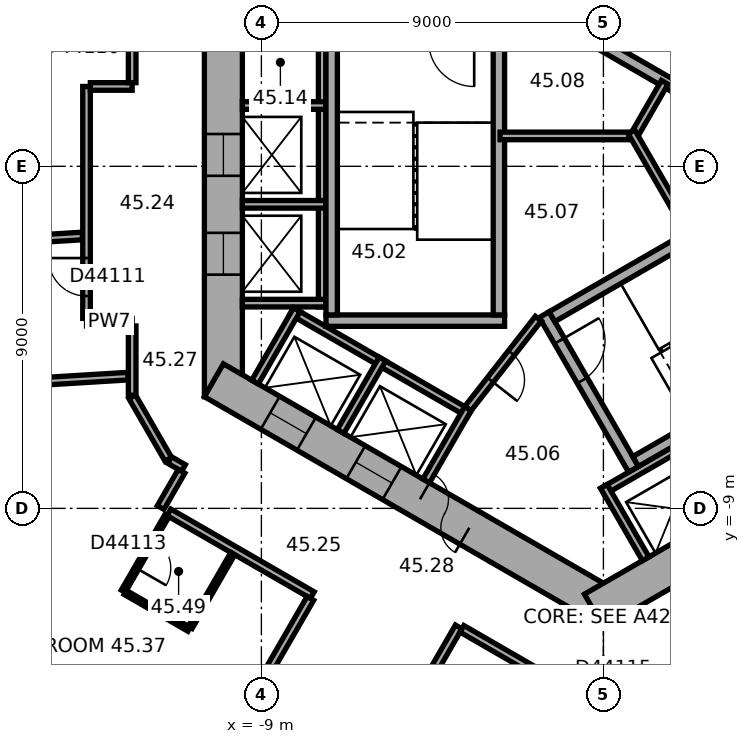
"""IFC4 building model, lengths in metres.
Left out: names, types, materials, properties, quantities, classifications, styles, units other than length and angle.
Written with IfcOpenShell. Run it as: python <this file> out.ifc"""

import sys

from ifc_helpers import new_model, si_unit, direction, frame, frame_2d, origin, place, context, subcontext, project, spatial, rectangle, extrude, element, fill, save


model = new_model("IFC4")
c1 = context("Model", 3, precision=1e-05, world=origin(), true_north=direction((0.0, 1.0)))
c2 = subcontext(c1, "Body", "Model", "MODEL_VIEW")
j1 = project(units=[si_unit("LENGTHUNIT", "METRE"), si_unit("PLANEANGLEUNIT", "RADIAN")], contexts=[c1])
p1 = place(None, origin())
s1 = spatial("IfcSite", under=j1, at=p1, CompositionType="ELEMENT")
p2 = place(p1, origin())
s2 = spatial("IfcBuilding", under=s1, at=p2, CompositionType="ELEMENT")
p3 = place(p2, frame((0.0, 0.0, 183.6)))
s3 = spatial("IfcBuildingStorey", under=s2, at=p3, CompositionType="ELEMENT", Elevation=183.6)
p4 = place(p3, frame((-10.0, 6.062, 0.0), z_axis=(0.0, 0.0, 1.0), x_axis=(0.0, -1.0, 0.0)))
e1 = element("IfcWall", 1, at=p4, inside=s3, PredefinedType="SHEAR", context=c2, shape_type="SweptSolid", body=[
    extrude(rectangle(XDim=12.125, YDim=1.0, at=frame_2d((6.062, 0.0))), origin(), (0.0, 0.0, 1.0), 3.7),
])
p5 = place(p4, frame((5.212, 0.0, 0.0)))
e2 = element("IfcOpeningElement", 2, at=p5, cuts=e1, PredefinedType="OPENING", context=c2, shape_type="SweptSolid", body=[
    extrude(rectangle(XDim=1.1, YDim=2.1, at=frame_2d((0.55, 1.05))), frame((0.0, 0.51, 0.0), z_axis=(0.0, -1.0, 0.0), x_axis=(1.0, 0.0, 0.0)), (0.0, 0.0, 1.0), 1.02),
])
p6 = place(p4, frame((7.812, 0.0, 0.0)))
e3 = element("IfcOpeningElement", 3, at=p6, cuts=e1, PredefinedType="OPENING", context=c2, shape_type="SweptSolid", body=[
    extrude(rectangle(XDim=1.1, YDim=2.1, at=frame_2d((0.55, 1.05))), frame((0.0, 0.51, 0.0), z_axis=(0.0, -1.0, 0.0), x_axis=(1.0, 0.0, 0.0)), (0.0, 0.0, 1.0), 1.02),
])
p7 = place(p3, frame((-10.25, -5.629, 0.0), z_axis=(0.0, 0.0, 1.0), x_axis=(0.866022616891, -0.50000482701, 0.0)))
e4 = element("IfcWall", 4, at=p7, inside=s3, PredefinedType="SHEAR", context=c2, shape_type="SweptSolid", body=[
    extrude(rectangle(XDim=12.125, YDim=1.0, at=frame_2d((6.062, 0.0))), origin(), (0.0, 0.0, 1.0), 3.7),
])
p8 = place(p7, frame((6.262, 0.0, 0.0)))
e5 = element("IfcOpeningElement", 5, at=p8, cuts=e4, PredefinedType="OPENING", context=c2, shape_type="SweptSolid", body=[
    extrude(rectangle(XDim=1.5, YDim=2.1, at=frame_2d((0.75, 1.05))), frame((0.0, 0.51, 0.0), z_axis=(0.0, -1.0, 0.0), x_axis=(1.0, 0.0, 0.0)), (0.0, 0.0, 1.0), 1.02),
])
p9 = place(p7, frame((1.712, 0.0, 0.0)))
e6 = element("IfcOpeningElement", 6, at=p9, cuts=e4, PredefinedType="OPENING", context=c2, shape_type="SweptSolid", body=[
    extrude(rectangle(XDim=1.1, YDim=2.1, at=frame_2d((0.55, 1.05))), frame((0.0, 0.51, 0.0), z_axis=(0.0, -1.0, 0.0), x_axis=(1.0, 0.0, 0.0)), (0.0, 0.0, 1.0), 1.02),
])
p10 = place(p7, frame((4.312, 0.0, 0.0)))
e7 = element("IfcOpeningElement", 7, at=p10, cuts=e4, PredefinedType="OPENING", context=c2, shape_type="SweptSolid", body=[
    extrude(rectangle(XDim=1.1, YDim=2.1, at=frame_2d((0.55, 1.05))), frame((0.0, 0.51, 0.0), z_axis=(0.0, -1.0, 0.0), x_axis=(1.0, 0.0, 0.0)), (0.0, 0.0, 1.0), 1.02),
])
p11 = place(p3, frame((-0.25, -11.691, 0.0), z_axis=(0.0, 0.0, 1.0), x_axis=(0.866022616891, 0.50000482701, 0.0)))
e8 = element("IfcWall", 8, at=p11, inside=s3, PredefinedType="SHEAR", context=c2, shape_type="SweptSolid", body=[
    extrude(rectangle(XDim=12.125, YDim=1.0, at=frame_2d((6.062, 0.0))), origin(), (0.0, 0.0, 1.0), 3.7),
])
p12 = place(p11, frame((2.612, 0.0, 0.0)))
e9 = element("IfcOpeningElement", 9, at=p12, cuts=e8, PredefinedType="OPENING", context=c2, shape_type="SweptSolid", body=[
    extrude(rectangle(XDim=1.1, YDim=2.1, at=frame_2d((0.55, 1.05))), frame((0.0, 0.51, 0.0), z_axis=(0.0, -1.0, 0.0), x_axis=(1.0, 0.0, 0.0)), (0.0, 0.0, 1.0), 1.02),
])
p13 = place(p11, frame((5.212, 0.0, 0.0)))
e10 = element("IfcOpeningElement", 10, at=p13, cuts=e8, PredefinedType="OPENING", context=c2, shape_type="SweptSolid", body=[
    extrude(rectangle(XDim=1.1, YDim=2.1, at=frame_2d((0.55, 1.05))), frame((0.0, 0.51, 0.0), z_axis=(0.0, -1.0, 0.0), x_axis=(1.0, 0.0, 0.0)), (0.0, 0.0, 1.0), 1.02),
])
p14 = place(p11, frame((7.812, 0.0, 0.0)))
e11 = element("IfcOpeningElement", 11, at=p14, cuts=e8, PredefinedType="OPENING", context=c2, shape_type="SweptSolid", body=[
    extrude(rectangle(XDim=1.1, YDim=2.1, at=frame_2d((0.55, 1.05))), frame((0.0, 0.51, 0.0), z_axis=(0.0, -1.0, 0.0), x_axis=(1.0, 0.0, 0.0)), (0.0, 0.0, 1.0), 1.02),
])
p15 = place(p3, frame((-7.4, 4.3, 0.0), z_axis=(0.0, 0.0, 1.0), x_axis=(0.0, -1.0, 0.0)))
e12 = element("IfcWall", 12, at=p15, inside=s3, PredefinedType="PARTITIONING", context=c2, shape_type="SweptSolid", body=[
    extrude(rectangle(XDim=8.0, YDim=0.2, at=frame_2d((4.0, 0.0))), origin(), (0.0, 0.0, 1.0), 3.42),
])
for number, where, z_axis, x_axis in (
    (13, (-7.3, 1.6, 0.0), (0.0, 0.0, 1.0), (-1.0, 0.0, 0.0)),
    (14, (-7.3, -1.0, 0.0), (0.0, 0.0, 1.0), (-1.0, 0.0, 0.0)),
    (15, (-7.3, -3.6, 0.0), (0.0, 0.0, 1.0), (-1.0, 0.0, 0.0)),
):
    element("IfcWall", number, at=place(p3, frame(where, z_axis=z_axis, x_axis=x_axis)), inside=s3, PredefinedType="PARTITIONING", context=c2, shape_type="SweptSolid", body=[
        extrude(rectangle(XDim=2.2, YDim=0.2, at=frame_2d((1.1, 0.0))), origin(), (0.0, 0.0, 1.0), 3.42),
    ])
p16 = place(p3, frame((-8.203, -3.809, 0.0), z_axis=(0.0, 0.0, 1.0), x_axis=(0.866028230842, -0.499995103361, 0.0)))
e16 = element("IfcWall", 16, at=p16, inside=s3, PredefinedType="PARTITIONING", context=c2, shape_type="SweptSolid", body=[
    extrude(rectangle(XDim=5.4, YDim=0.2, at=frame_2d((2.7, 0.0))), origin(), (0.0, 0.0, 1.0), 3.42),
])
for number, where, z_axis, x_axis in (
    (17, (-8.067, -3.772, 0.0), (0.0, 0.0, 1.0), (-0.5, -0.866, 0.0)),
    (18, (-5.815, -5.072, 0.0), (0.0, 0.0, 1.0), (-0.5, -0.866, 0.0)),
):
    element("IfcWall", number, at=place(p3, frame(where, z_axis=z_axis, x_axis=x_axis)), inside=s3, PredefinedType="PARTITIONING", context=c2, shape_type="SweptSolid", body=[
        extrude(rectangle(XDim=2.2, YDim=0.2, at=frame_2d((1.1, 0.0))), origin(), (0.0, 0.0, 1.0), 3.42),
    ])
p17 = place(p3, frame((-3.563, -6.372, 0.0), z_axis=(0.0, 0.0, 1.0), x_axis=(-0.499994660107, -0.866028486751, 0.0)))
e19 = element("IfcWall", 19, at=p17, inside=s3, PredefinedType="PARTITIONING", context=c2, shape_type="SweptSolid", body=[
    extrude(rectangle(XDim=2.2, YDim=0.2, at=frame_2d((1.1, 0.0))), origin(), (0.0, 0.0, 1.0), 3.42),
])
p18 = place(p3, frame((-0.024, -8.559, 0.0), z_axis=(0.0, 0.0, 1.0), x_axis=(0.866026010844, 0.49999894854, 0.0)))
e20 = element("IfcWall", 20, at=p18, inside=s3, PredefinedType="PARTITIONING", context=c2, shape_type="SweptSolid", body=[
    extrude(rectangle(XDim=8.0, YDim=0.2, at=frame_2d((4.0, 0.0))), origin(), (0.0, 0.0, 1.0), 3.42),
])
p19 = place(p3, frame((0.013, -8.422, 0.0), z_axis=(0.0, 0.0, 1.0), x_axis=(0.500077893725, -0.86598042715, 0.0)))
e21 = element("IfcWall", 21, at=p19, inside=s3, PredefinedType="PARTITIONING", context=c2, shape_type="SweptSolid", body=[
    extrude(rectangle(XDim=2.2, YDim=0.2, at=frame_2d((1.1, 0.0))), origin(), (0.0, 0.0, 1.0), 3.42),
])
p20 = place(p3, frame((4.103, 0.807, 0.0), z_axis=(0.0, 0.0, 1.0), x_axis=(-0.866027801685, 0.499995846692, 0.0)))
e22 = element("IfcWall", 22, at=p20, inside=s3, PredefinedType="SHEAR", context=c2, shape_type="SweptSolid", body=[
    extrude(rectangle(XDim=7.06, YDim=0.3, at=frame_2d((3.53, 0.0))), origin(), (0.0, 0.0, 1.0), 3.42),
])
p21 = place(p3, frame((-2.6, -4.06, 0.0), z_axis=(0.0, 0.0, 1.0), x_axis=(-1.0, 0.0, 0.0)))
e23 = element("IfcWall", 23, at=p21, inside=s3, PredefinedType="SHEAR", context=c2, shape_type="SweptSolid", body=[
    extrude(rectangle(XDim=4.7, YDim=0.3, at=frame_2d((2.35, 0.0))), origin(), (0.0, 0.0, 1.0), 3.42),
])
for number, where, z_axis, x_axis in (
    (24, (-2.75, 3.15, 0.0), (0.0, 0.0, 1.0), (0.0, -1.0, 0.0)),
    (25, (-7.15, 3.15, 0.0), (0.0, 0.0, 1.0), (0.0, -1.0, 0.0)),
):
    element("IfcWall", number, at=place(p3, frame(where, z_axis=z_axis, x_axis=x_axis)), inside=s3, PredefinedType="SHEAR", context=c2, shape_type="SweptSolid", body=[
        extrude(rectangle(XDim=7.06, YDim=0.3, at=frame_2d((3.53, 0.0))), origin(), (0.0, 0.0, 1.0), 3.42),
    ])
p22 = place(p3, frame((-1.558, -3.902, 0.0), z_axis=(0.0, 0.0, 1.0), x_axis=(0.499977259774, -0.866038532462, 0.0)))
e26 = element("IfcWall", 26, at=p22, inside=s3, PredefinedType="SHEAR", context=c2, shape_type="SweptSolid", body=[
    extrude(rectangle(XDim=4.7, YDim=0.3, at=frame_2d((2.35, 0.0))), origin(), (0.0, 0.0, 1.0), 3.42),
])
p23 = place(p22, frame((0.8, 0.0, 0.0)))
e27 = element("IfcOpeningElement", 27, at=p23, cuts=e26, PredefinedType="OPENING", context=c2, shape_type="SweptSolid", body=[
    extrude(rectangle(XDim=1.2, YDim=2.1, at=frame_2d((0.6, 1.05))), frame((0.0, 0.16, 0.0), z_axis=(0.0, -1.0, 0.0), x_axis=(1.0, 0.0, 0.0)), (0.0, 0.0, 1.0), 0.32),
])
for number, where, z_axis, x_axis in (
    (28, (-1.353, -3.957, 0.0), (0.0, 0.0, 1.0), (0.866, 0.5, 0.0)),
    (29, (0.847, -7.767, 0.0), (0.0, 0.0, 1.0), (0.866, 0.5, 0.0)),
):
    element("IfcWall", number, at=place(p3, frame(where, z_axis=z_axis, x_axis=x_axis)), inside=s3, PredefinedType="SHEAR", context=c2, shape_type="SweptSolid", body=[
        extrude(rectangle(XDim=7.06, YDim=0.3, at=frame_2d((3.53, 0.0))), origin(), (0.0, 0.0, 1.0), 3.42),
    ])
p24 = place(p3, frame((-1.712, -4.008, 0.0), z_axis=(0.0, 0.0, 1.0), x_axis=(-0.616549420702, -0.787316208287, 0.0)))
e30 = element("IfcWall", 30, at=p24, inside=s3, PredefinedType="PARTITIONING", context=c2, shape_type="SweptSolid", body=[
    extrude(rectangle(XDim=3.002, YDim=0.2, at=frame_2d((1.501, 0.0))), origin(), (0.0, 0.0, 1.0), 3.42),
])
p25 = place(p24, frame((1.15, 0.0, 0.0)))
e31 = element("IfcOpeningElement", 31, at=p25, cuts=e30, PredefinedType="OPENING", context=c2, shape_type="SweptSolid", body=[
    extrude(rectangle(XDim=0.9, YDim=2.1, at=frame_2d((0.45, 1.05))), frame((0.0, 0.11, 0.0), z_axis=(0.0, -1.0, 0.0), x_axis=(1.0, 0.0, 0.0)), (0.0, 0.0, 1.0), 0.22),
])
p26 = place(p3, frame((0.92, 0.8, 0.0), z_axis=(0.0, 0.0, 1.0), x_axis=(-1.0, 0.0, 0.0)))
e32 = element("IfcWall", 32, at=p26, inside=s3, PredefinedType="PARTITIONING", context=c2, shape_type="SweptSolid", body=[
    extrude(rectangle(XDim=3.64, YDim=0.2, at=frame_2d((1.82, 0.0))), origin(), (0.0, 0.0, 1.0), 3.42),
])
p27 = place(p3, frame((0.74, 0.696, 0.0), z_axis=(0.0, 0.0, 1.0), x_axis=(0.499956301907, 0.86605063142, 0.0)))
e33 = element("IfcWall", 33, at=p27, inside=s3, PredefinedType="PARTITIONING", context=c2, shape_type="SweptSolid", body=[
    extrude(rectangle(XDim=1.747, YDim=0.2, at=frame_2d((0.874, 0.0))), origin(), (0.0, 0.0, 1.0), 3.42),
])
p28 = place(p3, frame((0.74, 0.904, 0.0), z_axis=(0.0, 0.0, 1.0), x_axis=(0.500028278809, -0.866009076391, 0.0)))
e34 = element("IfcWall", 34, at=p28, inside=s3, PredefinedType="PARTITIONING", context=c2, shape_type="SweptSolid", body=[
    extrude(rectangle(XDim=3.133, YDim=0.2, at=frame_2d((1.566, 0.0))), origin(), (0.0, 0.0, 1.0), 3.42),
])
p29 = place(p3, frame((-20.651, -2.258, 0.0), z_axis=(0.0, 0.0, 1.0), x_axis=(0.998133960965, 0.061062230286, 0.0)))
e35 = element("IfcWall", 35, at=p29, inside=s3, PredefinedType="PARTITIONING", context=c2, shape_type="SweptSolid", body=[
    extrude(rectangle(XDim=6.953, YDim=0.2, at=frame_2d((3.477, 0.0))), origin(), (0.0, 0.0, 1.0), 3.42),
])
p30 = place(p3, frame((-20.421, -6.005, 0.0), z_axis=(0.0, 0.0, 1.0), x_axis=(0.998134865741, 0.061047438866, 0.0)))
e36 = element("IfcWall", 36, at=p30, inside=s3, PredefinedType="PARTITIONING", context=c2, shape_type="SweptSolid", body=[
    extrude(rectangle(XDim=7.927, YDim=0.2, at=frame_2d((3.963, 0.0))), origin(), (0.0, 0.0, 1.0), 2.87),
])
p31 = place(p3, frame((-13.601, -4.101, 0.0), z_axis=(0.0, 0.0, 1.0), x_axis=(1.0, 0.0, 0.0)))
e37 = element("IfcWall", 37, at=p31, inside=s3, PredefinedType="PARTITIONING", context=c2, shape_type="SweptSolid", body=[
    extrude(rectangle(XDim=1.201, YDim=0.2, at=frame_2d((0.601, 0.0))), origin(), (0.0, 0.0, 1.0), 3.42),
])
p32 = place(p3, frame((-13.601, 2.101, 0.0), z_axis=(0.0, 0.0, 1.0), x_axis=(0.0, -1.0, 0.0)))
e38 = element("IfcWall", 38, at=p32, inside=s3, PredefinedType="PARTITIONING", context=c2, shape_type="SweptSolid", body=[
    extrude(rectangle(XDim=6.102, YDim=0.2, at=frame_2d((3.051, 0.0))), origin(), (0.0, 0.0, 1.0), 3.42),
])
p33 = place(p32, frame((4.515, 0.0, 0.0)))
e39 = element("IfcOpeningElement", 39, at=p33, cuts=e38, PredefinedType="OPENING", context=c2, shape_type="SweptSolid", body=[
    extrude(rectangle(XDim=1.0, YDim=2.1, at=frame_2d((0.5, 1.05))), frame((0.0, 0.11, 0.0), z_axis=(0.0, -1.0, 0.0), x_axis=(1.0, 0.0, 0.0)), (0.0, 0.0, 1.0), 0.22),
])
p34 = place(p3, frame((-12.635, -11.182, 0.0), z_axis=(0.0, 0.0, 1.0), x_axis=(0.499952165731, 0.866053019151, 0.0)))
e40 = element("IfcWall", 40, at=p34, inside=s3, PredefinedType="PARTITIONING", context=c2, shape_type="SweptSolid", body=[
    extrude(rectangle(XDim=2.3, YDim=0.12, at=frame_2d((1.15, 0.0))), origin(), (0.0, 0.0, 1.0), 3.42),
])
p35 = place(p34, frame((0.7, 0.0, 0.0)))
e41 = element("IfcOpeningElement", 41, at=p35, cuts=e40, PredefinedType="OPENING", context=c2, shape_type="SweptSolid", body=[
    extrude(rectangle(XDim=0.9, YDim=2.1, at=frame_2d((0.45, 1.05))), frame((0.0, 0.07, 0.0), z_axis=(0.0, -1.0, 0.0), x_axis=(1.0, 0.0, 0.0)), (0.0, 0.0, 1.0), 0.14),
])
p36 = place(p3, frame((-12.4, -6.062, 0.0), z_axis=(0.0, 0.0, 1.0), x_axis=(0.500022797313, -0.86601224135, 0.0)))
e42 = element("IfcWall", 42, at=p36, inside=s3, PredefinedType="PARTITIONING", context=c2, shape_type="SweptSolid", body=[
    extrude(rectangle(XDim=1.9, YDim=0.2, at=frame_2d((0.95, 0.0))), origin(), (0.0, 0.0, 1.0), 3.42),
])
p37 = place(p3, frame((-12.4, -4.201, 0.0), z_axis=(0.0, 0.0, 1.0), x_axis=(0.0, -1.0, 0.0)))
e43 = element("IfcWall", 43, at=p37, inside=s3, PredefinedType="PARTITIONING", context=c2, shape_type="SweptSolid", body=[
    extrude(rectangle(XDim=1.821, YDim=0.2, at=frame_2d((0.911, 0.0))), origin(), (0.0, 0.0, 1.0), 3.42),
])
p38 = place(p3, frame((-12.4, 2.101, 0.0), z_axis=(0.0, 0.0, 1.0), x_axis=(-1.0, 0.0, 0.0)))
e44 = element("IfcWall", 44, at=p38, inside=s3, PredefinedType="PARTITIONING", context=c2, shape_type="SweptSolid", body=[
    extrude(rectangle(XDim=1.101, YDim=0.2, at=frame_2d((0.551, 0.0))), origin(), (0.0, 0.0, 1.0), 3.42),
])
p39 = place(p3, frame((-12.4, 5.812, 0.0), z_axis=(0.0, 0.0, 1.0), x_axis=(0.0, -1.0, 0.0)))
e45 = element("IfcWall", 45, at=p39, inside=s3, PredefinedType="PARTITIONING", context=c2, shape_type="SweptSolid", body=[
    extrude(rectangle(XDim=3.611, YDim=0.2, at=frame_2d((1.806, 0.0))), origin(), (0.0, 0.0, 1.0), 3.42),
])
p40 = place(p3, frame((-11.435, -9.103, 0.0), z_axis=(0.0, 0.0, 1.0), x_axis=(0.866007399799, -0.500031182522, 0.0)))
e46 = element("IfcWall", 46, at=p40, inside=s3, PredefinedType="PARTITIONING", context=c2, shape_type="SweptSolid", body=[
    extrude(rectangle(XDim=4.358, YDim=0.2, at=frame_2d((2.179, 0.0))), origin(), (0.0, 0.0, 1.0), 3.42),
])
p41 = place(p3, frame((-11.415, -7.728, 0.0), z_axis=(0.0, 0.0, 1.0), x_axis=(0.865915281873, -0.500190688257, 0.0)))
e47 = element("IfcWall", 47, at=p41, inside=s3, PredefinedType="PARTITIONING", context=c2, shape_type="SweptSolid", body=[
    extrude(rectangle(XDim=0.421, YDim=0.2, at=frame_2d((0.21, 0.0))), origin(), (0.0, 0.0, 1.0), 3.42),
])
p42 = place(p3, frame((-11.235, -17.474, 0.0), z_axis=(0.0, 0.0, 1.0), x_axis=(0.500009260695, 0.866020057054, 0.0)))
e48 = element("IfcWall", 48, at=p42, inside=s3, PredefinedType="PARTITIONING", context=c2, shape_type="SweptSolid", body=[
    extrude(rectangle(XDim=7.049, YDim=0.2, at=frame_2d((3.524, 0.0))), origin(), (0.0, 0.0, 1.0), 2.87),
])
p43 = place(p42, frame((3.024, 0.0, 0.0)))
e49 = element("IfcOpeningElement", 49, at=p43, cuts=e48, PredefinedType="OPENING", context=c2, shape_type="SweptSolid", body=[
    extrude(rectangle(XDim=1.0, YDim=2.1, at=frame_2d((0.5, 1.05))), frame((0.0, 0.11, 0.0), z_axis=(0.0, -1.0, 0.0), x_axis=(1.0, 0.0, 0.0)), (0.0, 0.0, 1.0), 0.22),
])
p44 = place(p3, frame((-11.101, -8.025, 0.0), z_axis=(0.0, 0.0, 1.0), x_axis=(-0.500074377092, -0.865982457891, 0.0)))
e50 = element("IfcWall", 50, at=p44, inside=s3, PredefinedType="PARTITIONING", context=c2, shape_type="SweptSolid", body=[
    extrude(rectangle(XDim=1.101, YDim=0.2, at=frame_2d((0.55, 0.0))), origin(), (0.0, 0.0, 1.0), 3.42),
])
p45 = place(p3, frame((-10.903, -12.182, 0.0), z_axis=(0.0, 0.0, 1.0), x_axis=(-0.866011626733, 0.500023861795, 0.0)))
e51 = element("IfcWall", 51, at=p45, inside=s3, PredefinedType="PARTITIONING", context=c2, shape_type="SweptSolid", body=[
    extrude(rectangle(XDim=1.94, YDim=0.12, at=frame_2d((0.97, 0.0))), origin(), (0.0, 0.0, 1.0), 3.42),
])
p46 = place(p3, frame((-9.753, -10.19, 0.0), z_axis=(0.0, 0.0, 1.0), x_axis=(-0.49994888933, -0.866054910533, 0.0)))
e52 = element("IfcWall", 52, at=p46, inside=s3, PredefinedType="PARTITIONING", context=c2, shape_type="SweptSolid", body=[
    extrude(rectangle(XDim=2.24, YDim=0.12, at=frame_2d((1.12, 0.0))), origin(), (0.0, 0.0, 1.0), 3.42),
])
p47 = place(p3, frame((-7.984, -19.351, 0.0), z_axis=(0.0, 0.0, 1.0), x_axis=(0.500010139422, 0.866019549707, 0.0)))
e53 = element("IfcWall", 53, at=p47, inside=s3, PredefinedType="PARTITIONING", context=c2, shape_type="SweptSolid", body=[
    extrude(rectangle(XDim=8.35, YDim=0.2, at=frame_2d((4.175, 0.0))), origin(), (0.0, 0.0, 1.0), 3.42),
])
p48 = place(p47, frame((3.675, 0.0, 0.0)))
e54 = element("IfcOpeningElement", 54, at=p48, cuts=e53, PredefinedType="OPENING", context=c2, shape_type="SweptSolid", body=[
    extrude(rectangle(XDim=1.0, YDim=2.1, at=frame_2d((0.5, 1.05))), frame((0.0, 0.11, 0.0), z_axis=(0.0, -1.0, 0.0), x_axis=(1.0, 0.0, 0.0)), (0.0, 0.0, 1.0), 0.22),
])
p49 = place(p3, frame((-3.722, -12.169, 0.0), z_axis=(0.0, 0.0, 1.0), x_axis=(0.866033163891, -0.499986558861, 0.0)))
e55 = element("IfcWall", 55, at=p49, inside=s3, PredefinedType="PARTITIONING", context=c2, shape_type="SweptSolid", body=[
    extrude(rectangle(XDim=3.201, YDim=0.2, at=frame_2d((1.6, 0.0))), origin(), (0.0, 0.0, 1.0), 3.42),
])
p50 = place(p3, frame((1.204, -13.623, 0.0), z_axis=(0.0, 0.0, 1.0), x_axis=(0.866040989419, 0.499973003918, 0.0)))
e56 = element("IfcWall", 56, at=p50, inside=s3, PredefinedType="PARTITIONING", context=c2, shape_type="SweptSolid", body=[
    extrude(rectangle(XDim=1.068, YDim=0.2, at=frame_2d((0.534, 0.0))), origin(), (0.0, 0.0, 1.0), 3.42),
])
p51 = place(p8, origin())
e57 = element("IfcDoor", 57, at=p51, inside=s3, OperationType="DOUBLE_DOOR_SINGLE_SWING", PredefinedType="DOOR", context=c2, shape_type="SweptSolid", body=[
    extrude(rectangle(XDim=1.5, YDim=2.1, at=frame_2d((0.75, 1.05))), frame((0.0, 0.025, 0.0), z_axis=(0.0, -1.0, 0.0), x_axis=(1.0, 0.0, 0.0)), (0.0, 0.0, 1.0), 0.05),
])
fill(e5, e57)
p52 = place(p23, origin())
e58 = element("IfcDoor", 58, at=p52, inside=s3, OperationType="SINGLE_SWING_RIGHT", PredefinedType="DOOR", context=c2, shape_type="SweptSolid", body=[
    extrude(rectangle(XDim=1.2, YDim=2.1, at=frame_2d((0.6, 1.05))), frame((0.0, 0.025, 0.0), z_axis=(0.0, -1.0, 0.0), x_axis=(1.0, 0.0, 0.0)), (0.0, 0.0, 1.0), 0.05),
])
fill(e27, e58)
p53 = place(p25, origin())
e59 = element("IfcDoor", 59, at=p53, inside=s3, OperationType="SINGLE_SWING_LEFT", PredefinedType="DOOR", context=c2, shape_type="SweptSolid", body=[
    extrude(rectangle(XDim=0.9, YDim=2.1, at=frame_2d((0.45, 1.05))), frame((0.0, 0.025, 0.0), z_axis=(0.0, -1.0, 0.0), x_axis=(1.0, 0.0, 0.0)), (0.0, 0.0, 1.0), 0.05),
])
fill(e31, e59)
p54 = place(p5, origin())
e60 = element("IfcDoor", 60, at=p54, inside=s3, OperationType="DOUBLE_DOOR_SLIDING", PredefinedType="DOOR", context=c2, shape_type="SweptSolid", body=[
    extrude(rectangle(XDim=1.1, YDim=2.1, at=frame_2d((0.55, 1.05))), frame((0.0, 0.025, 0.0), z_axis=(0.0, -1.0, 0.0), x_axis=(1.0, 0.0, 0.0)), (0.0, 0.0, 1.0), 0.05),
])
fill(e2, e60)
p55 = place(p6, origin())
e61 = element("IfcDoor", 61, at=p55, inside=s3, OperationType="DOUBLE_DOOR_SLIDING", PredefinedType="DOOR", context=c2, shape_type="SweptSolid", body=[
    extrude(rectangle(XDim=1.1, YDim=2.1, at=frame_2d((0.55, 1.05))), frame((0.0, 0.025, 0.0), z_axis=(0.0, -1.0, 0.0), x_axis=(1.0, 0.0, 0.0)), (0.0, 0.0, 1.0), 0.05),
])
fill(e3, e61)
p56 = place(p9, origin())
e62 = element("IfcDoor", 62, at=p56, inside=s3, OperationType="DOUBLE_DOOR_SLIDING", PredefinedType="DOOR", context=c2, shape_type="SweptSolid", body=[
    extrude(rectangle(XDim=1.1, YDim=2.1, at=frame_2d((0.55, 1.05))), frame((0.0, 0.025, 0.0), z_axis=(0.0, -1.0, 0.0), x_axis=(1.0, 0.0, 0.0)), (0.0, 0.0, 1.0), 0.05),
])
fill(e6, e62)
p57 = place(p10, origin())
e63 = element("IfcDoor", 63, at=p57, inside=s3, OperationType="DOUBLE_DOOR_SLIDING", PredefinedType="DOOR", context=c2, shape_type="SweptSolid", body=[
    extrude(rectangle(XDim=1.1, YDim=2.1, at=frame_2d((0.55, 1.05))), frame((0.0, 0.025, 0.0), z_axis=(0.0, -1.0, 0.0), x_axis=(1.0, 0.0, 0.0)), (0.0, 0.0, 1.0), 0.05),
])
fill(e7, e63)
p58 = place(p33, origin())
e64 = element("IfcDoor", 64, at=p58, inside=s3, OperationType="SINGLE_SWING_LEFT", PredefinedType="DOOR", context=c2, shape_type="SweptSolid", body=[
    extrude(rectangle(XDim=1.0, YDim=2.1, at=frame_2d((0.5, 1.05))), frame((0.0, 0.025, 0.0), z_axis=(0.0, -1.0, 0.0), x_axis=(1.0, 0.0, 0.0)), (0.0, 0.0, 1.0), 0.05),
])
fill(e39, e64)
p59 = place(p35, origin())
e65 = element("IfcDoor", 65, at=p59, inside=s3, OperationType="SINGLE_SWING_LEFT", PredefinedType="DOOR", context=c2, shape_type="SweptSolid", body=[
    extrude(rectangle(XDim=0.9, YDim=2.1, at=frame_2d((0.45, 1.05))), frame((0.0, 0.025, 0.0), z_axis=(0.0, -1.0, 0.0), x_axis=(1.0, 0.0, 0.0)), (0.0, 0.0, 1.0), 0.05),
])
fill(e41, e65)
save(model, sys.argv[1])
